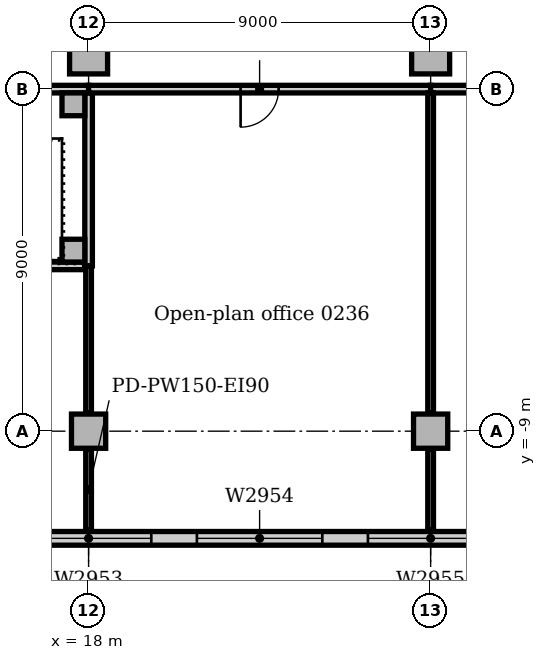
"""IFC4 building model, lengths in metres.
Left out: names, types, materials, properties, quantities, classifications, styles, units other than length and angle.
Written with IfcOpenShell. Run it as: python <this file> out.ifc"""

import sys

from ifc_helpers import new_model, si_unit, direction, frame, frame_2d, origin, origin_2d, place, context, subcontext, project, spatial, rectangle, extrude, element, fill, save


model = new_model("IFC4")
c1 = context("Model", 3, precision=1e-05, world=origin(), true_north=direction((0.0, 1.0)))
c2 = subcontext(c1, "Body", "Model", "MODEL_VIEW")
j1 = project(units=[si_unit("LENGTHUNIT", "METRE"), si_unit("PLANEANGLEUNIT", "RADIAN")], contexts=[c1])
p1 = place(None, origin())
s1 = spatial("IfcSite", under=j1, at=p1, CompositionType="ELEMENT")
p2 = place(p1, origin())
s2 = spatial("IfcBuilding", under=s1, at=p2, CompositionType="ELEMENT")
p3 = place(p2, frame((0.0, 0.0, 11.0)))
s3 = spatial("IfcBuildingStorey", under=s2, at=p3, CompositionType="ELEMENT", Elevation=11.0)
for number, where, z_axis, x_axis in (
    (1, (18.0, 0.9, 0.0), (0.0, 0.0, 1.0), (1.0, 0.0, 0.0)),
    (2, (27.0, 0.9, 0.0), (0.0, 0.0, 1.0), (1.0, 0.0, 0.0)),
):
    element("IfcColumn", number, at=place(p3, frame(where, z_axis=z_axis, x_axis=x_axis)), inside=s3, PredefinedType="COLUMN", context=c2, shape_type="SweptSolid", body=[
        extrude(rectangle(XDim=1.0, YDim=1.0, at=origin_2d()), origin(), (0.0, 0.0, 1.0), 4.7),
    ])
for number, where, z_axis, x_axis in (
    (3, (18.0, -9.0, 0.0), (0.0, 0.0, 1.0), (1.0, 0.0, 0.0)),
    (4, (27.0, -9.0, 0.0), (0.0, 0.0, 1.0), (1.0, 0.0, 0.0)),
):
    element("IfcColumn", number, at=place(p3, frame(where, z_axis=z_axis, x_axis=x_axis)), inside=s3, PredefinedType="COLUMN", context=c2, shape_type="SweptSolid", body=[
        extrude(rectangle(XDim=0.9, YDim=0.9, at=origin_2d()), origin(), (0.0, 0.0, 1.0), 4.7),
    ])
p4 = place(p3, frame((-81.0, -11.82, 0.0), z_axis=(0.0, 0.0, 1.0), x_axis=(1.0, 0.0, 0.0)))
e5 = element("IfcWall", 5, at=p4, inside=s3, PredefinedType="STANDARD", context=c2, shape_type="SweptSolid", body=[
    extrude(rectangle(XDim=144.0, YDim=0.36, at=frame_2d((72.0, 0.0))), origin(), (0.0, 0.0, 1.0), 4.7),
])
p5 = place(p4, frame((2.85, 0.0, 0.9)))
e6 = element("IfcOpeningElement", 6, at=p5, cuts=e5, PredefinedType="OPENING", context=c2, shape_type="SweptSolid", body=[
    extrude(rectangle(XDim=3.3, YDim=2.4, at=frame_2d((1.65, 1.2))), frame((0.0, 0.19, 0.0), z_axis=(0.0, -1.0, 0.0), x_axis=(1.0, 0.0, 0.0)), (0.0, 0.0, 1.0), 0.38),
])
p6 = place(p4, frame((7.35, 0.0, 0.9)))
e7 = element("IfcOpeningElement", 7, at=p6, cuts=e5, PredefinedType="OPENING", context=c2, shape_type="SweptSolid", body=[
    extrude(rectangle(XDim=3.3, YDim=2.4, at=frame_2d((1.65, 1.2))), frame((0.0, 0.19, 0.0), z_axis=(0.0, -1.0, 0.0), x_axis=(1.0, 0.0, 0.0)), (0.0, 0.0, 1.0), 0.38),
])
p7 = place(p4, frame((11.85, 0.0, 0.9)))
e8 = element("IfcOpeningElement", 8, at=p7, cuts=e5, PredefinedType="OPENING", context=c2, shape_type="SweptSolid", body=[
    extrude(rectangle(XDim=3.3, YDim=2.4, at=frame_2d((1.65, 1.2))), frame((0.0, 0.19, 0.0), z_axis=(0.0, -1.0, 0.0), x_axis=(1.0, 0.0, 0.0)), (0.0, 0.0, 1.0), 0.38),
])
p8 = place(p4, frame((16.35, 0.0, 0.9)))
e9 = element("IfcOpeningElement", 9, at=p8, cuts=e5, PredefinedType="OPENING", context=c2, shape_type="SweptSolid", body=[
    extrude(rectangle(XDim=3.3, YDim=2.4, at=frame_2d((1.65, 1.2))), frame((0.0, 0.19, 0.0), z_axis=(0.0, -1.0, 0.0), x_axis=(1.0, 0.0, 0.0)), (0.0, 0.0, 1.0), 0.38),
])
p9 = place(p4, frame((20.85, 0.0, 0.9)))
e10 = element("IfcOpeningElement", 10, at=p9, cuts=e5, PredefinedType="OPENING", context=c2, shape_type="SweptSolid", body=[
    extrude(rectangle(XDim=3.3, YDim=2.4, at=frame_2d((1.65, 1.2))), frame((0.0, 0.19, 0.0), z_axis=(0.0, -1.0, 0.0), x_axis=(1.0, 0.0, 0.0)), (0.0, 0.0, 1.0), 0.38),
])
p10 = place(p4, frame((25.35, 0.0, 0.9)))
e11 = element("IfcOpeningElement", 11, at=p10, cuts=e5, PredefinedType="OPENING", context=c2, shape_type="SweptSolid", body=[
    extrude(rectangle(XDim=3.3, YDim=2.4, at=frame_2d((1.65, 1.2))), frame((0.0, 0.19, 0.0), z_axis=(0.0, -1.0, 0.0), x_axis=(1.0, 0.0, 0.0)), (0.0, 0.0, 1.0), 0.38),
])
p11 = place(p4, frame((29.85, 0.0, 0.9)))
e12 = element("IfcOpeningElement", 12, at=p11, cuts=e5, PredefinedType="OPENING", context=c2, shape_type="SweptSolid", body=[
    extrude(rectangle(XDim=3.3, YDim=2.4, at=frame_2d((1.65, 1.2))), frame((0.0, 0.19, 0.0), z_axis=(0.0, -1.0, 0.0), x_axis=(1.0, 0.0, 0.0)), (0.0, 0.0, 1.0), 0.38),
])
p12 = place(p4, frame((34.35, 0.0, 0.9)))
e13 = element("IfcOpeningElement", 13, at=p12, cuts=e5, PredefinedType="OPENING", context=c2, shape_type="SweptSolid", body=[
    extrude(rectangle(XDim=3.3, YDim=2.4, at=frame_2d((1.65, 1.2))), frame((0.0, 0.19, 0.0), z_axis=(0.0, -1.0, 0.0), x_axis=(1.0, 0.0, 0.0)), (0.0, 0.0, 1.0), 0.38),
])
p13 = place(p4, frame((38.85, 0.0, 0.9)))
e14 = element("IfcOpeningElement", 14, at=p13, cuts=e5, PredefinedType="OPENING", context=c2, shape_type="SweptSolid", body=[
    extrude(rectangle(XDim=3.3, YDim=2.4, at=frame_2d((1.65, 1.2))), frame((0.0, 0.19, 0.0), z_axis=(0.0, -1.0, 0.0), x_axis=(1.0, 0.0, 0.0)), (0.0, 0.0, 1.0), 0.38),
])
p14 = place(p4, frame((43.35, 0.0, 0.9)))
e15 = element("IfcOpeningElement", 15, at=p14, cuts=e5, PredefinedType="OPENING", context=c2, shape_type="SweptSolid", body=[
    extrude(rectangle(XDim=3.3, YDim=2.4, at=frame_2d((1.65, 1.2))), frame((0.0, 0.19, 0.0), z_axis=(0.0, -1.0, 0.0), x_axis=(1.0, 0.0, 0.0)), (0.0, 0.0, 1.0), 0.38),
])
p15 = place(p4, frame((47.85, 0.0, 0.9)))
e16 = element("IfcOpeningElement", 16, at=p15, cuts=e5, PredefinedType="OPENING", context=c2, shape_type="SweptSolid", body=[
    extrude(rectangle(XDim=3.3, YDim=2.4, at=frame_2d((1.65, 1.2))), frame((0.0, 0.19, 0.0), z_axis=(0.0, -1.0, 0.0), x_axis=(1.0, 0.0, 0.0)), (0.0, 0.0, 1.0), 0.38),
])
p16 = place(p4, frame((52.35, 0.0, 0.9)))
e17 = element("IfcOpeningElement", 17, at=p16, cuts=e5, PredefinedType="OPENING", context=c2, shape_type="SweptSolid", body=[
    extrude(rectangle(XDim=3.3, YDim=2.4, at=frame_2d((1.65, 1.2))), frame((0.0, 0.19, 0.0), z_axis=(0.0, -1.0, 0.0), x_axis=(1.0, 0.0, 0.0)), (0.0, 0.0, 1.0), 0.38),
])
p17 = place(p4, frame((56.85, 0.0, 0.9)))
e18 = element("IfcOpeningElement", 18, at=p17, cuts=e5, PredefinedType="OPENING", context=c2, shape_type="SweptSolid", body=[
    extrude(rectangle(XDim=3.3, YDim=2.4, at=frame_2d((1.65, 1.2))), frame((0.0, 0.19, 0.0), z_axis=(0.0, -1.0, 0.0), x_axis=(1.0, 0.0, 0.0)), (0.0, 0.0, 1.0), 0.38),
])
p18 = place(p4, frame((61.35, 0.0, 0.9)))
e19 = element("IfcOpeningElement", 19, at=p18, cuts=e5, PredefinedType="OPENING", context=c2, shape_type="SweptSolid", body=[
    extrude(rectangle(XDim=3.3, YDim=2.4, at=frame_2d((1.65, 1.2))), frame((0.0, 0.19, 0.0), z_axis=(0.0, -1.0, 0.0), x_axis=(1.0, 0.0, 0.0)), (0.0, 0.0, 1.0), 0.38),
])
p19 = place(p4, frame((65.85, 0.0, 0.9)))
e20 = element("IfcOpeningElement", 20, at=p19, cuts=e5, PredefinedType="OPENING", context=c2, shape_type="SweptSolid", body=[
    extrude(rectangle(XDim=3.3, YDim=2.4, at=frame_2d((1.65, 1.2))), frame((0.0, 0.19, 0.0), z_axis=(0.0, -1.0, 0.0), x_axis=(1.0, 0.0, 0.0)), (0.0, 0.0, 1.0), 0.38),
])
p20 = place(p4, frame((70.35, 0.0, 0.9)))
e21 = element("IfcOpeningElement", 21, at=p20, cuts=e5, PredefinedType="OPENING", context=c2, shape_type="SweptSolid", body=[
    extrude(rectangle(XDim=3.3, YDim=2.4, at=frame_2d((1.65, 1.2))), frame((0.0, 0.19, 0.0), z_axis=(0.0, -1.0, 0.0), x_axis=(1.0, 0.0, 0.0)), (0.0, 0.0, 1.0), 0.38),
])
p21 = place(p4, frame((74.85, 0.0, 0.9)))
e22 = element("IfcOpeningElement", 22, at=p21, cuts=e5, PredefinedType="OPENING", context=c2, shape_type="SweptSolid", body=[
    extrude(rectangle(XDim=3.3, YDim=2.4, at=frame_2d((1.65, 1.2))), frame((0.0, 0.19, 0.0), z_axis=(0.0, -1.0, 0.0), x_axis=(1.0, 0.0, 0.0)), (0.0, 0.0, 1.0), 0.38),
])
p22 = place(p4, frame((79.35, 0.0, 0.9)))
e23 = element("IfcOpeningElement", 23, at=p22, cuts=e5, PredefinedType="OPENING", context=c2, shape_type="SweptSolid", body=[
    extrude(rectangle(XDim=3.3, YDim=2.4, at=frame_2d((1.65, 1.2))), frame((0.0, 0.19, 0.0), z_axis=(0.0, -1.0, 0.0), x_axis=(1.0, 0.0, 0.0)), (0.0, 0.0, 1.0), 0.38),
])
p23 = place(p4, frame((83.85, 0.0, 0.9)))
e24 = element("IfcOpeningElement", 24, at=p23, cuts=e5, PredefinedType="OPENING", context=c2, shape_type="SweptSolid", body=[
    extrude(rectangle(XDim=3.3, YDim=2.4, at=frame_2d((1.65, 1.2))), frame((0.0, 0.19, 0.0), z_axis=(0.0, -1.0, 0.0), x_axis=(1.0, 0.0, 0.0)), (0.0, 0.0, 1.0), 0.38),
])
p24 = place(p4, frame((88.35, 0.0, 0.9)))
e25 = element("IfcOpeningElement", 25, at=p24, cuts=e5, PredefinedType="OPENING", context=c2, shape_type="SweptSolid", body=[
    extrude(rectangle(XDim=3.3, YDim=2.4, at=frame_2d((1.65, 1.2))), frame((0.0, 0.19, 0.0), z_axis=(0.0, -1.0, 0.0), x_axis=(1.0, 0.0, 0.0)), (0.0, 0.0, 1.0), 0.38),
])
p25 = place(p4, frame((92.85, 0.0, 0.9)))
e26 = element("IfcOpeningElement", 26, at=p25, cuts=e5, PredefinedType="OPENING", context=c2, shape_type="SweptSolid", body=[
    extrude(rectangle(XDim=3.3, YDim=2.4, at=frame_2d((1.65, 1.2))), frame((0.0, 0.19, 0.0), z_axis=(0.0, -1.0, 0.0), x_axis=(1.0, 0.0, 0.0)), (0.0, 0.0, 1.0), 0.38),
])
p26 = place(p4, frame((97.35, 0.0, 0.9)))
e27 = element("IfcOpeningElement", 27, at=p26, cuts=e5, PredefinedType="OPENING", context=c2, shape_type="SweptSolid", body=[
    extrude(rectangle(XDim=3.3, YDim=2.4, at=frame_2d((1.65, 1.2))), frame((0.0, 0.19, 0.0), z_axis=(0.0, -1.0, 0.0), x_axis=(1.0, 0.0, 0.0)), (0.0, 0.0, 1.0), 0.38),
])
p27 = place(p4, frame((101.85, 0.0, 0.9)))
e28 = element("IfcOpeningElement", 28, at=p27, cuts=e5, PredefinedType="OPENING", context=c2, shape_type="SweptSolid", body=[
    extrude(rectangle(XDim=3.3, YDim=2.4, at=frame_2d((1.65, 1.2))), frame((0.0, 0.19, 0.0), z_axis=(0.0, -1.0, 0.0), x_axis=(1.0, 0.0, 0.0)), (0.0, 0.0, 1.0), 0.38),
])
p28 = place(p4, frame((106.35, 0.0, 0.9)))
e29 = element("IfcOpeningElement", 29, at=p28, cuts=e5, PredefinedType="OPENING", context=c2, shape_type="SweptSolid", body=[
    extrude(rectangle(XDim=3.3, YDim=2.4, at=frame_2d((1.65, 1.2))), frame((0.0, 0.19, 0.0), z_axis=(0.0, -1.0, 0.0), x_axis=(1.0, 0.0, 0.0)), (0.0, 0.0, 1.0), 0.38),
])
p29 = place(p4, frame((110.85, 0.0, 0.9)))
e30 = element("IfcOpeningElement", 30, at=p29, cuts=e5, PredefinedType="OPENING", context=c2, shape_type="SweptSolid", body=[
    extrude(rectangle(XDim=3.3, YDim=2.4, at=frame_2d((1.65, 1.2))), frame((0.0, 0.19, 0.0), z_axis=(0.0, -1.0, 0.0), x_axis=(1.0, 0.0, 0.0)), (0.0, 0.0, 1.0), 0.38),
])
p30 = place(p4, frame((115.35, 0.0, 0.9)))
e31 = element("IfcOpeningElement", 31, at=p30, cuts=e5, PredefinedType="OPENING", context=c2, shape_type="SweptSolid", body=[
    extrude(rectangle(XDim=3.3, YDim=2.4, at=frame_2d((1.65, 1.2))), frame((0.0, 0.19, 0.0), z_axis=(0.0, -1.0, 0.0), x_axis=(1.0, 0.0, 0.0)), (0.0, 0.0, 1.0), 0.38),
])
p31 = place(p4, frame((119.85, 0.0, 0.9)))
e32 = element("IfcOpeningElement", 32, at=p31, cuts=e5, PredefinedType="OPENING", context=c2, shape_type="SweptSolid", body=[
    extrude(rectangle(XDim=3.3, YDim=2.4, at=frame_2d((1.65, 1.2))), frame((0.0, 0.19, 0.0), z_axis=(0.0, -1.0, 0.0), x_axis=(1.0, 0.0, 0.0)), (0.0, 0.0, 1.0), 0.38),
])
p32 = place(p4, frame((124.35, 0.0, 0.9)))
e33 = element("IfcOpeningElement", 33, at=p32, cuts=e5, PredefinedType="OPENING", context=c2, shape_type="SweptSolid", body=[
    extrude(rectangle(XDim=3.3, YDim=2.4, at=frame_2d((1.65, 1.2))), frame((0.0, 0.19, 0.0), z_axis=(0.0, -1.0, 0.0), x_axis=(1.0, 0.0, 0.0)), (0.0, 0.0, 1.0), 0.38),
])
p33 = place(p4, frame((128.85, 0.0, 0.9)))
e34 = element("IfcOpeningElement", 34, at=p33, cuts=e5, PredefinedType="OPENING", context=c2, shape_type="SweptSolid", body=[
    extrude(rectangle(XDim=3.3, YDim=2.4, at=frame_2d((1.65, 1.2))), frame((0.0, 0.19, 0.0), z_axis=(0.0, -1.0, 0.0), x_axis=(1.0, 0.0, 0.0)), (0.0, 0.0, 1.0), 0.38),
])
p34 = place(p4, frame((133.35, 0.0, 0.9)))
e35 = element("IfcOpeningElement", 35, at=p34, cuts=e5, PredefinedType="OPENING", context=c2, shape_type="SweptSolid", body=[
    extrude(rectangle(XDim=3.3, YDim=2.4, at=frame_2d((1.65, 1.2))), frame((0.0, 0.19, 0.0), z_axis=(0.0, -1.0, 0.0), x_axis=(1.0, 0.0, 0.0)), (0.0, 0.0, 1.0), 0.38),
])
p35 = place(p4, frame((137.85, 0.0, 0.9)))
e36 = element("IfcOpeningElement", 36, at=p35, cuts=e5, PredefinedType="OPENING", context=c2, shape_type="SweptSolid", body=[
    extrude(rectangle(XDim=3.3, YDim=2.4, at=frame_2d((1.65, 1.2))), frame((0.0, 0.19, 0.0), z_axis=(0.0, -1.0, 0.0), x_axis=(1.0, 0.0, 0.0)), (0.0, 0.0, 1.0), 0.38),
])
for number, where, z_axis, x_axis in (
    (37, (17.6, -4.25, 0.0), (0.0, 0.0, 1.0), (1.0, 0.0, 0.0)),
    (38, (17.6, -0.4, 0.0), (0.0, 0.0, 1.0), (1.0, 0.0, 0.0)),
):
    element("IfcColumn", number, at=place(p3, frame(where, z_axis=z_axis, x_axis=x_axis)), inside=s3, PredefinedType="COLUMN", context=c2, shape_type="SweptSolid", body=[
        extrude(rectangle(XDim=0.6, YDim=0.6, at=origin_2d()), origin(), (0.0, 0.0, 1.0), 5.0),
    ])
p36 = place(p3, frame((9.0, 0.0, 0.0), z_axis=(0.0, 0.0, 1.0), x_axis=(1.0, 0.0, 0.0)))
e39 = element("IfcWall", 39, at=p36, inside=s3, PredefinedType="SOLIDWALL", context=c2, shape_type="SweptSolid", body=[
    extrude(rectangle(XDim=9.0, YDim=0.2, at=frame_2d((4.5, 0.0))), origin(), (0.0, 0.0, 1.0), 4.7),
])
p37 = place(p36, frame((0.8, 0.0, 0.0)))
e40 = element("IfcOpeningElement", 40, at=p37, cuts=e39, PredefinedType="OPENING", context=c2, shape_type="SweptSolid", body=[
    extrude(rectangle(XDim=1.2, YDim=2.1, at=frame_2d((0.6, 1.05))), frame((0.0, 0.11, 0.0), z_axis=(0.0, -1.0, 0.0), x_axis=(1.0, 0.0, 0.0)), (0.0, 0.0, 1.0), 0.22),
])
p38 = place(p3, frame((8.9, -4.65, 0.0), z_axis=(0.0, 0.0, 1.0), x_axis=(1.0, 0.0, 0.0)))
e41 = element("IfcWall", 41, at=p38, inside=s3, PredefinedType="SOLIDWALL", context=c2, shape_type="SweptSolid", body=[
    extrude(rectangle(XDim=9.0, YDim=0.2, at=frame_2d((4.5, 0.0))), origin(), (0.0, 0.0, 1.0), 4.7),
])
p39 = place(p3, frame((18.0, -4.65, 0.0), z_axis=(0.0, 0.0, 1.0), x_axis=(0.0, 1.0, 0.0)))
e42 = element("IfcWall", 42, at=p39, inside=s3, PredefinedType="SOLIDWALL", context=c2, shape_type="SweptSolid", body=[
    extrude(rectangle(XDim=4.55, YDim=0.2, at=frame_2d((2.275, 0.0))), origin(), (0.0, 0.0, 1.0), 4.7),
])
p40 = place(p3, frame((18.0, 0.0, 0.0), z_axis=(0.0, 0.0, 1.0), x_axis=(1.0, 0.0, 0.0)))
e43 = element("IfcWall", 43, at=p40, inside=s3, PredefinedType="PARTITIONING", context=c2, shape_type="SweptSolid", body=[
    extrude(rectangle(XDim=9.0, YDim=0.2, at=frame_2d((4.5, 0.0))), origin(), (0.0, 0.0, 1.0), 4.7),
])
p41 = place(p40, frame((4.0, 0.0, 0.0)))
e44 = element("IfcOpeningElement", 44, at=p41, cuts=e43, PredefinedType="OPENING", context=c2, shape_type="SweptSolid", body=[
    extrude(rectangle(XDim=1.0, YDim=2.1, at=frame_2d((0.5, 1.05))), frame((0.0, 0.11, 0.0), z_axis=(0.0, -1.0, 0.0), x_axis=(1.0, 0.0, 0.0)), (0.0, 0.0, 1.0), 0.22),
])
p42 = place(p3, frame((27.0, 0.0, 0.0), z_axis=(0.0, 0.0, 1.0), x_axis=(1.0, 0.0, 0.0)))
e45 = element("IfcWall", 45, at=p42, inside=s3, PredefinedType="PARTITIONING", context=c2, shape_type="SweptSolid", body=[
    extrude(rectangle(XDim=9.0, YDim=0.2, at=frame_2d((4.5, 0.0))), origin(), (0.0, 0.0, 1.0), 4.7),
])
p43 = place(p42, frame((4.0, 0.0, 0.0)))
e46 = element("IfcOpeningElement", 46, at=p43, cuts=e45, PredefinedType="OPENING", context=c2, shape_type="SweptSolid", body=[
    extrude(rectangle(XDim=1.0, YDim=2.1, at=frame_2d((0.5, 1.05))), frame((0.0, 0.11, 0.0), z_axis=(0.0, -1.0, 0.0), x_axis=(1.0, 0.0, 0.0)), (0.0, 0.0, 1.0), 0.22),
])
p44 = place(p3, frame((18.0, -11.6, 0.0), z_axis=(0.0, 0.0, 1.0), x_axis=(0.0, 1.0, 0.0)))
e47 = element("IfcWall", 47, at=p44, inside=s3, PredefinedType="PARTITIONING", context=c2, shape_type="SweptSolid", body=[
    extrude(rectangle(XDim=2.13, YDim=0.15, at=frame_2d((1.065, 0.0))), origin(), (0.0, 0.0, 1.0), 4.7),
])
p45 = place(p3, frame((18.0, -8.53, 0.0), z_axis=(0.0, 0.0, 1.0), x_axis=(0.0, 1.0, 0.0)))
e48 = element("IfcWall", 48, at=p45, inside=s3, PredefinedType="PARTITIONING", context=c2, shape_type="SweptSolid", body=[
    extrude(rectangle(XDim=3.88, YDim=0.15, at=frame_2d((1.94, 0.0))), origin(), (0.0, 0.0, 1.0), 4.7),
])
p46 = place(p3, frame((27.0, -11.6, 0.0), z_axis=(0.0, 0.0, 1.0), x_axis=(0.0, 1.0, 0.0)))
e49 = element("IfcWall", 49, at=p46, inside=s3, PredefinedType="PARTITIONING", context=c2, shape_type="SweptSolid", body=[
    extrude(rectangle(XDim=2.13, YDim=0.15, at=frame_2d((1.065, 0.0))), origin(), (0.0, 0.0, 1.0), 4.7),
])
p47 = place(p3, frame((27.0, -8.53, 0.0), z_axis=(0.0, 0.0, 1.0), x_axis=(0.0, 1.0, 0.0)))
e50 = element("IfcWall", 50, at=p47, inside=s3, PredefinedType="PARTITIONING", context=c2, shape_type="SweptSolid", body=[
    extrude(rectangle(XDim=8.43, YDim=0.15, at=frame_2d((4.215, 0.0))), origin(), (0.0, 0.0, 1.0), 4.7),
])
p48 = place(p26, origin())
e51 = element("IfcWindow", 51, at=p48, inside=s3, PartitioningType="SINGLE_PANEL", PredefinedType="WINDOW", context=c2, shape_type="SweptSolid", body=[
    extrude(rectangle(XDim=3.3, YDim=2.4, at=frame_2d((1.65, 1.2))), frame((0.0, 0.13, 0.0), z_axis=(0.0, -1.0, 0.0), x_axis=(1.0, 0.0, 0.0)), (0.0, 0.0, 1.0), 0.06),
])
fill(e27, e51)
p49 = place(p27, origin())
e52 = element("IfcWindow", 52, at=p49, inside=s3, PartitioningType="SINGLE_PANEL", PredefinedType="WINDOW", context=c2, shape_type="SweptSolid", body=[
    extrude(rectangle(XDim=3.3, YDim=2.4, at=frame_2d((1.65, 1.2))), frame((0.0, 0.13, 0.0), z_axis=(0.0, -1.0, 0.0), x_axis=(1.0, 0.0, 0.0)), (0.0, 0.0, 1.0), 0.06),
])
fill(e28, e52)
p50 = place(p28, origin())
e53 = element("IfcWindow", 53, at=p50, inside=s3, PartitioningType="SINGLE_PANEL", PredefinedType="WINDOW", context=c2, shape_type="SweptSolid", body=[
    extrude(rectangle(XDim=3.3, YDim=2.4, at=frame_2d((1.65, 1.2))), frame((0.0, 0.13, 0.0), z_axis=(0.0, -1.0, 0.0), x_axis=(1.0, 0.0, 0.0)), (0.0, 0.0, 1.0), 0.06),
])
fill(e29, e53)
p51 = place(p41, frame((1.0, 0.0, 0.0), z_axis=(0.0, 0.0, 1.0), x_axis=(-1.0, 0.0, 0.0)))
e54 = element("IfcDoor", 54, at=p51, inside=s3, OperationType="SINGLE_SWING_RIGHT", PredefinedType="DOOR", context=c2, shape_type="SweptSolid", body=[
    extrude(rectangle(XDim=1.0, YDim=2.1, at=frame_2d((0.5, 1.05))), frame((0.0, 0.025, 0.0), z_axis=(0.0, -1.0, 0.0), x_axis=(1.0, 0.0, 0.0)), (0.0, 0.0, 1.0), 0.05),
])
fill(e44, e54)
save(model, sys.argv[1])
